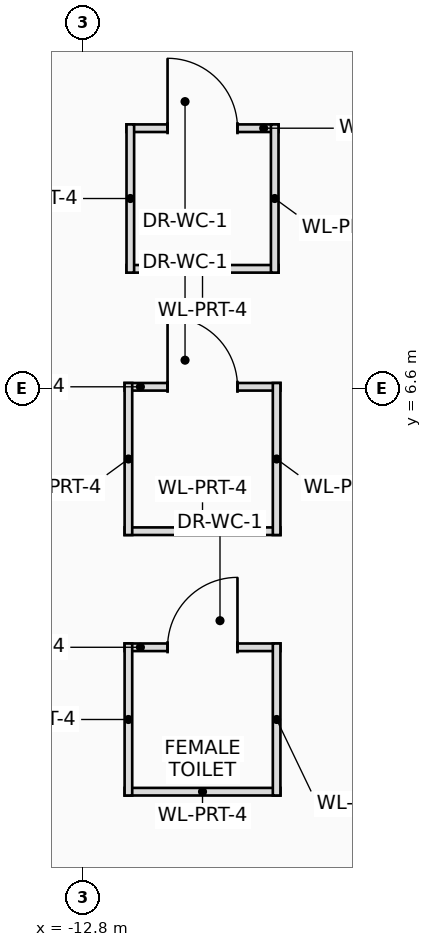
"""IFC4 building model, lengths in metres.
Left out: names, types, materials, properties, quantities, classifications, styles, units other than length and angle.
Written with IfcOpenShell. Run it as: python <this file> out.ifc"""

import sys

from ifc_helpers import new_model, si_unit, direction, frame, frame_2d, origin, place, context, subcontext, project, spatial, rectangle, extrude, element, fill, save


model = new_model("IFC4")
c1 = context("Model", 3, precision=1e-05, world=origin(), true_north=direction((0.0, 1.0)))
c2 = subcontext(c1, "Body", "Model", "MODEL_VIEW")
j1 = project(units=[si_unit("LENGTHUNIT", "METRE"), si_unit("PLANEANGLEUNIT", "RADIAN")], contexts=[c1])
p1 = place(None, origin())
s1 = spatial("IfcSite", under=j1, at=p1, CompositionType="ELEMENT")
p2 = place(p1, origin())
s2 = spatial("IfcBuilding", under=s1, at=p2, CompositionType="ELEMENT")
p3 = place(p2, frame((0.0, 0.0, 125.0)))
s3 = spatial("IfcBuildingStorey", under=s2, at=p3, CompositionType="ELEMENT", Elevation=125.0)
p4 = place(p3, frame((-12.254, 6.618, 0.0), z_axis=(0.0, 0.0, 1.0), x_axis=(1.0, 0.0, 0.0)))
e1 = element("IfcWall", 1, at=p4, inside=s3, PredefinedType="PARTITIONING", context=c2, shape_type="SweptSolid", body=[
    extrude(rectangle(XDim=2.05, YDim=0.1, at=frame_2d((1.025, 0.0))), origin(), (0.0, 0.0, 1.0), 3.855),
])
p5 = place(p4, frame((0.565, 0.0, 0.0)))
e2 = element("IfcOpeningElement", 2, at=p5, cuts=e1, PredefinedType="OPENING", context=c2, shape_type="SweptSolid", body=[
    extrude(rectangle(XDim=0.92, YDim=2.1, at=frame_2d((0.46, 1.05))), frame((0.0, 0.06, 0.0), z_axis=(0.0, -1.0, 0.0), x_axis=(1.0, 0.0, 0.0)), (0.0, 0.0, 1.0), 0.12),
])
p6 = place(p3, frame((-10.204, 4.718, 0.0), z_axis=(0.0, 0.0, 1.0), x_axis=(-1.0, 0.0, 0.0)))
e3 = element("IfcWall", 3, at=p6, inside=s3, PredefinedType="PARTITIONING", context=c2, shape_type="SweptSolid", body=[
    extrude(rectangle(XDim=2.05, YDim=0.1, at=frame_2d((1.025, 0.0))), origin(), (0.0, 0.0, 1.0), 3.855),
])
for number, where, z_axis, x_axis in (
    (4, (-10.254, 6.668, 0.0), (0.0, 0.0, 1.0), (0.0, -1.0, 0.0)),
    (5, (-12.204, 4.668, 0.0), (0.0, 0.0, 1.0), (0.0, 1.0, 0.0)),
):
    element("IfcWall", number, at=place(p3, frame(where, z_axis=z_axis, x_axis=x_axis)), inside=s3, PredefinedType="PARTITIONING", context=c2, shape_type="SweptSolid", body=[
        extrude(rectangle(XDim=2.0, YDim=0.1, at=frame_2d((1.0, 0.0))), origin(), (0.0, 0.0, 1.0), 3.655),
    ])
p7 = place(p3, frame((-12.254, 3.191, 0.0), z_axis=(0.0, 0.0, 1.0), x_axis=(1.0, 0.0, 0.0)))
e6 = element("IfcWall", 6, at=p7, inside=s3, PredefinedType="PARTITIONING", context=c2, shape_type="SweptSolid", body=[
    extrude(rectangle(XDim=2.05, YDim=0.1, at=frame_2d((1.025, 0.0))), origin(), (0.0, 0.0, 1.0), 3.655),
])
p8 = place(p7, frame((0.565, 0.0, 0.0)))
e7 = element("IfcOpeningElement", 7, at=p8, cuts=e6, PredefinedType="OPENING", context=c2, shape_type="SweptSolid", body=[
    extrude(rectangle(XDim=0.92, YDim=2.1, at=frame_2d((0.46, 1.05))), frame((0.0, 0.06, 0.0), z_axis=(0.0, -1.0, 0.0), x_axis=(1.0, 0.0, 0.0)), (0.0, 0.0, 1.0), 0.12),
])
p9 = place(p3, frame((-10.204, 1.291, 0.0), z_axis=(0.0, 0.0, 1.0), x_axis=(-1.0, 0.0, 0.0)))
e8 = element("IfcWall", 8, at=p9, inside=s3, PredefinedType="PARTITIONING", context=c2, shape_type="SweptSolid", body=[
    extrude(rectangle(XDim=2.05, YDim=0.1, at=frame_2d((1.025, 0.0))), origin(), (0.0, 0.0, 1.0), 3.955),
])
for number, where, z_axis, x_axis in (
    (9, (-10.254, 3.241, 0.0), (0.0, 0.0, 1.0), (0.0, -1.0, 0.0)),
    (10, (-12.204, 1.241, 0.0), (0.0, 0.0, 1.0), (0.0, 1.0, 0.0)),
):
    element("IfcWall", number, at=place(p3, frame(where, z_axis=z_axis, x_axis=x_axis)), inside=s3, PredefinedType="PARTITIONING", context=c2, shape_type="SweptSolid", body=[
        extrude(rectangle(XDim=2.0, YDim=0.1, at=frame_2d((1.0, 0.0))), origin(), (0.0, 0.0, 1.0), 3.655),
    ])
p10 = place(p3, frame((-12.229, 10.02, 0.0), z_axis=(0.0, 0.0, 1.0), x_axis=(1.0, 0.0, 0.0)))
e11 = element("IfcWall", 11, at=p10, inside=s3, PredefinedType="PARTITIONING", context=c2, shape_type="SweptSolid", body=[
    extrude(rectangle(XDim=2.0, YDim=0.1, at=frame_2d((1.0, 0.0))), origin(), (0.0, 0.0, 1.0), 3.655),
])
p11 = place(p10, frame((0.54, 0.0, 0.0)))
e12 = element("IfcOpeningElement", 12, at=p11, cuts=e11, PredefinedType="OPENING", context=c2, shape_type="SweptSolid", body=[
    extrude(rectangle(XDim=0.92, YDim=2.1, at=frame_2d((0.46, 1.05))), frame((0.0, 0.06, 0.0), z_axis=(0.0, -1.0, 0.0), x_axis=(1.0, 0.0, 0.0)), (0.0, 0.0, 1.0), 0.12),
])
p12 = place(p3, frame((-10.229, 8.17, 0.0), z_axis=(0.0, 0.0, 1.0), x_axis=(-1.0, 0.0, 0.0)))
e13 = element("IfcWall", 13, at=p12, inside=s3, PredefinedType="PARTITIONING", context=c2, shape_type="SweptSolid", body=[
    extrude(rectangle(XDim=2.0, YDim=0.1, at=frame_2d((1.0, 0.0))), origin(), (0.0, 0.0, 1.0), 3.855),
])
for number, where, z_axis, x_axis in (
    (14, (-10.279, 10.07, 0.0), (0.0, 0.0, 1.0), (0.0, -1.0, 0.0)),
    (15, (-12.179, 8.12, 0.0), (0.0, 0.0, 1.0), (0.0, 1.0, 0.0)),
):
    element("IfcWall", number, at=place(p3, frame(where, z_axis=z_axis, x_axis=x_axis)), inside=s3, PredefinedType="PARTITIONING", context=c2, shape_type="SweptSolid", body=[
        extrude(rectangle(XDim=1.95, YDim=0.1, at=frame_2d((0.975, 0.0))), origin(), (0.0, 0.0, 1.0), 3.655),
    ])
p13 = place(p5, origin())
e16 = element("IfcDoor", 16, at=p13, inside=s3, OperationType="SINGLE_SWING_LEFT", PredefinedType="DOOR", context=c2, shape_type="SweptSolid", body=[
    extrude(rectangle(XDim=0.92, YDim=2.1, at=frame_2d((0.46, 1.05))), frame((0.0, 0.025, 0.0), z_axis=(0.0, -1.0, 0.0), x_axis=(1.0, 0.0, 0.0)), (0.0, 0.0, 1.0), 0.05),
])
fill(e2, e16)
p14 = place(p8, origin())
e17 = element("IfcDoor", 17, at=p14, inside=s3, OperationType="SINGLE_SWING_RIGHT", PredefinedType="DOOR", context=c2, shape_type="SweptSolid", body=[
    extrude(rectangle(XDim=0.92, YDim=2.1, at=frame_2d((0.46, 1.05))), frame((0.0, 0.025, 0.0), z_axis=(0.0, -1.0, 0.0), x_axis=(1.0, 0.0, 0.0)), (0.0, 0.0, 1.0), 0.05),
])
fill(e7, e17)
p15 = place(p11, origin())
e18 = element("IfcDoor", 18, at=p15, inside=s3, OperationType="SINGLE_SWING_LEFT", PredefinedType="DOOR", context=c2, shape_type="SweptSolid", body=[
    extrude(rectangle(XDim=0.92, YDim=2.1, at=frame_2d((0.46, 1.05))), frame((0.0, 0.025, 0.0), z_axis=(0.0, -1.0, 0.0), x_axis=(1.0, 0.0, 0.0)), (0.0, 0.0, 1.0), 0.05),
])
fill(e12, e18)
save(model, sys.argv[1])
